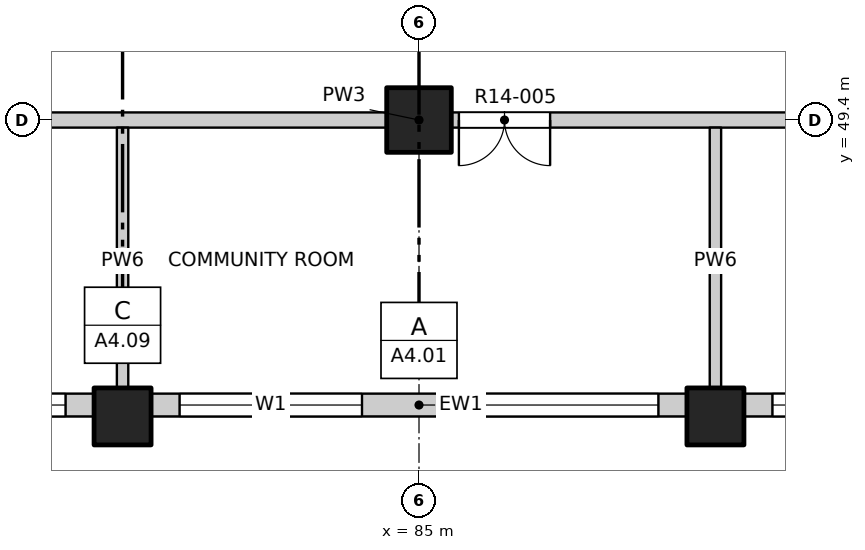
"""IFC4 building model, lengths in metres.
Left out: names, types, materials, properties, quantities, classifications, styles, units other than length and angle.
Written with IfcOpenShell. Run it as: python <this file> out.ifc"""

import sys

from ifc_helpers import new_model, si_unit, direction, frame, frame_2d, origin, origin_2d, place, context, subcontext, project, spatial, rectangle, extrude, element, fill, save


model = new_model("IFC4")
c1 = context("Model", 3, precision=1e-05, world=origin(), true_north=direction((0.0, 1.0)))
c2 = subcontext(c1, "Body", "Model", "MODEL_VIEW")
j1 = project(units=[si_unit("LENGTHUNIT", "METRE"), si_unit("PLANEANGLEUNIT", "RADIAN")], contexts=[c1])
p1 = place(None, origin())
s1 = spatial("IfcSite", under=j1, at=p1, CompositionType="ELEMENT")
p2 = place(p1, origin())
s2 = spatial("IfcBuilding", under=s1, at=p2, CompositionType="ELEMENT")
p3 = place(p2, frame((0.0, 0.0, 152.0)))
s3 = spatial("IfcBuildingStorey", under=s2, at=p3, CompositionType="ELEMENT", Elevation=152.0)
for number, where, z_axis, x_axis in (
    (1, (81.1, 45.5, -0.25), (0.0, 0.0, 1.0), (1.0, 0.0, 0.0)),
    (2, (88.9, 45.5, -0.25), (0.0, 0.0, 1.0), (1.0, 0.0, 0.0)),
):
    element("IfcColumn", number, at=place(p3, frame(where, z_axis=z_axis, x_axis=x_axis)), inside=s3, PredefinedType="COLUMN", context=c2, shape_type="SweptSolid", body=[
        extrude(rectangle(XDim=0.75, YDim=0.75, at=origin_2d()), origin(), (0.0, 0.0, 1.0), 3.4),
    ])
p4 = place(p3, frame((85.0, 49.4, -0.25), z_axis=(0.0, 0.0, 1.0), x_axis=(1.0, 0.0, 0.0)))
e3 = element("IfcColumn", 3, at=p4, inside=s3, PredefinedType="COLUMN", context=c2, shape_type="SweptSolid", body=[
    extrude(rectangle(XDim=0.85, YDim=0.85, at=origin_2d()), origin(), (0.0, 0.0, 1.0), 3.4),
])
p5 = place(p3, frame((73.675, 45.65, 0.0), z_axis=(0.0, 0.0, 1.0), x_axis=(1.0, 0.0, 0.0)))
e4 = element("IfcWall", 4, at=p5, inside=s3, PredefinedType="SOLIDWALL", context=c2, shape_type="SweptSolid", body=[
    extrude(rectangle(XDim=7.05, YDim=0.3, at=frame_2d((3.525, 0.0))), origin(), (0.0, 0.0, 1.0), 2.7),
])
p6 = place(p5, frame((0.375, 0.0, 0.9)))
e5 = element("IfcOpeningElement", 5, at=p6, cuts=e4, PredefinedType="OPENING", context=c2, shape_type="SweptSolid", body=[
    extrude(rectangle(XDim=2.4, YDim=1.8, at=frame_2d((1.2, 0.9))), frame((0.0, 0.16, 0.0), z_axis=(0.0, -1.0, 0.0), x_axis=(1.0, 0.0, 0.0)), (0.0, 0.0, 1.0), 0.32),
])
p7 = place(p5, frame((4.275, 0.0, 0.9)))
e6 = element("IfcOpeningElement", 6, at=p7, cuts=e4, PredefinedType="OPENING", context=c2, shape_type="SweptSolid", body=[
    extrude(rectangle(XDim=2.4, YDim=1.8, at=frame_2d((1.2, 0.9))), frame((0.0, 0.16, 0.0), z_axis=(0.0, -1.0, 0.0), x_axis=(1.0, 0.0, 0.0)), (0.0, 0.0, 1.0), 0.32),
])
p8 = place(p3, frame((81.475, 45.65, 0.0), z_axis=(0.0, 0.0, 1.0), x_axis=(1.0, 0.0, 0.0)))
e7 = element("IfcWall", 7, at=p8, inside=s3, PredefinedType="SOLIDWALL", context=c2, shape_type="SweptSolid", body=[
    extrude(rectangle(XDim=7.05, YDim=0.3, at=frame_2d((3.525, 0.0))), origin(), (0.0, 0.0, 1.0), 2.7),
])
p9 = place(p8, frame((0.375, 0.0, 0.9)))
e8 = element("IfcOpeningElement", 8, at=p9, cuts=e7, PredefinedType="OPENING", context=c2, shape_type="SweptSolid", body=[
    extrude(rectangle(XDim=2.4, YDim=1.8, at=frame_2d((1.2, 0.9))), frame((0.0, 0.16, 0.0), z_axis=(0.0, -1.0, 0.0), x_axis=(1.0, 0.0, 0.0)), (0.0, 0.0, 1.0), 0.32),
])
p10 = place(p8, frame((4.275, 0.0, 0.9)))
e9 = element("IfcOpeningElement", 9, at=p10, cuts=e7, PredefinedType="OPENING", context=c2, shape_type="SweptSolid", body=[
    extrude(rectangle(XDim=2.4, YDim=1.8, at=frame_2d((1.2, 0.9))), frame((0.0, 0.16, 0.0), z_axis=(0.0, -1.0, 0.0), x_axis=(1.0, 0.0, 0.0)), (0.0, 0.0, 1.0), 0.32),
])
p11 = place(p3, frame((89.275, 45.65, 0.0), z_axis=(0.0, 0.0, 1.0), x_axis=(1.0, 0.0, 0.0)))
e10 = element("IfcWall", 10, at=p11, inside=s3, PredefinedType="SOLIDWALL", context=c2, shape_type="SweptSolid", body=[
    extrude(rectangle(XDim=7.05, YDim=0.3, at=frame_2d((3.525, 0.0))), origin(), (0.0, 0.0, 1.0), 2.7),
])
p12 = place(p11, frame((0.375, 0.0, 0.9)))
e11 = element("IfcOpeningElement", 11, at=p12, cuts=e10, PredefinedType="OPENING", context=c2, shape_type="SweptSolid", body=[
    extrude(rectangle(XDim=2.4, YDim=1.8, at=frame_2d((1.2, 0.9))), frame((0.0, 0.16, 0.0), z_axis=(0.0, -1.0, 0.0), x_axis=(1.0, 0.0, 0.0)), (0.0, 0.0, 1.0), 0.32),
])
p13 = place(p11, frame((4.275, 0.0, 0.9)))
e12 = element("IfcOpeningElement", 12, at=p13, cuts=e10, PredefinedType="OPENING", context=c2, shape_type="SweptSolid", body=[
    extrude(rectangle(XDim=2.4, YDim=1.8, at=frame_2d((1.2, 0.9))), frame((0.0, 0.16, 0.0), z_axis=(0.0, -1.0, 0.0), x_axis=(1.0, 0.0, 0.0)), (0.0, 0.0, 1.0), 0.32),
])
p14 = place(p3, frame((73.2, 49.4, 0.0), z_axis=(0.0, 0.0, 1.0), x_axis=(1.0, 0.0, 0.0)))
e13 = element("IfcWall", 13, at=p14, inside=s3, PredefinedType="PARTITIONING", context=c2, shape_type="SweptSolid", body=[
    extrude(rectangle(XDim=23.6, YDim=0.2, at=frame_2d((11.8, 0.0))), origin(), (0.0, 0.0, 1.0), 3.15),
])
p15 = place(p14, frame((4.525, 0.0, 0.0)))
e14 = element("IfcOpeningElement", 14, at=p15, cuts=e13, PredefinedType="OPENING", context=c2, shape_type="SweptSolid", body=[
    extrude(rectangle(XDim=1.2, YDim=2.1, at=frame_2d((0.6, 1.05))), frame((0.0, 0.11, 0.0), z_axis=(0.0, -1.0, 0.0), x_axis=(1.0, 0.0, 0.0)), (0.0, 0.0, 1.0), 0.22),
])
p16 = place(p14, frame((12.325, 0.0, 0.0)))
e15 = element("IfcOpeningElement", 15, at=p16, cuts=e13, PredefinedType="OPENING", context=c2, shape_type="SweptSolid", body=[
    extrude(rectangle(XDim=1.2, YDim=2.1, at=frame_2d((0.6, 1.05))), frame((0.0, 0.11, 0.0), z_axis=(0.0, -1.0, 0.0), x_axis=(1.0, 0.0, 0.0)), (0.0, 0.0, 1.0), 0.22),
])
p17 = place(p14, frame((20.125, 0.0, 0.0)))
e16 = element("IfcOpeningElement", 16, at=p17, cuts=e13, PredefinedType="OPENING", context=c2, shape_type="SweptSolid", body=[
    extrude(rectangle(XDim=1.2, YDim=2.1, at=frame_2d((0.6, 1.05))), frame((0.0, 0.11, 0.0), z_axis=(0.0, -1.0, 0.0), x_axis=(1.0, 0.0, 0.0)), (0.0, 0.0, 1.0), 0.22),
])
for number, where, z_axis, x_axis in (
    (17, (81.1, 45.8, 0.0), (0.0, 0.0, 1.0), (0.0, 1.0, 0.0)),
    (18, (88.9, 45.8, 0.0), (0.0, 0.0, 1.0), (0.0, 1.0, 0.0)),
):
    element("IfcWall", number, at=place(p3, frame(where, z_axis=z_axis, x_axis=x_axis)), inside=s3, PredefinedType="PARTITIONING", context=c2, shape_type="SweptSolid", body=[
        extrude(rectangle(XDim=3.5, YDim=0.15, at=frame_2d((1.75, 0.0))), origin(), (0.0, 0.0, 1.0), 3.15),
    ])
p18 = place(p7, origin())
e19 = element("IfcWindow", 19, at=p18, inside=s3, PartitioningType="DOUBLE_PANEL_VERTICAL", PredefinedType="WINDOW", context=c2, shape_type="SweptSolid", body=[
    extrude(rectangle(XDim=2.4, YDim=1.8, at=frame_2d((1.2, 0.9))), frame((0.0, 0.03, 0.0), z_axis=(0.0, -1.0, 0.0), x_axis=(1.0, 0.0, 0.0)), (0.0, 0.0, 1.0), 0.06),
])
fill(e6, e19)
p19 = place(p9, origin())
e20 = element("IfcWindow", 20, at=p19, inside=s3, PartitioningType="DOUBLE_PANEL_VERTICAL", PredefinedType="WINDOW", context=c2, shape_type="SweptSolid", body=[
    extrude(rectangle(XDim=2.4, YDim=1.8, at=frame_2d((1.2, 0.9))), frame((0.0, 0.03, 0.0), z_axis=(0.0, -1.0, 0.0), x_axis=(1.0, 0.0, 0.0)), (0.0, 0.0, 1.0), 0.06),
])
fill(e8, e20)
p20 = place(p10, origin())
e21 = element("IfcWindow", 21, at=p20, inside=s3, PartitioningType="DOUBLE_PANEL_VERTICAL", PredefinedType="WINDOW", context=c2, shape_type="SweptSolid", body=[
    extrude(rectangle(XDim=2.4, YDim=1.8, at=frame_2d((1.2, 0.9))), frame((0.0, 0.03, 0.0), z_axis=(0.0, -1.0, 0.0), x_axis=(1.0, 0.0, 0.0)), (0.0, 0.0, 1.0), 0.06),
])
fill(e9, e21)
p21 = place(p12, origin())
e22 = element("IfcWindow", 22, at=p21, inside=s3, PartitioningType="DOUBLE_PANEL_VERTICAL", PredefinedType="WINDOW", context=c2, shape_type="SweptSolid", body=[
    extrude(rectangle(XDim=2.4, YDim=1.8, at=frame_2d((1.2, 0.9))), frame((0.0, 0.03, 0.0), z_axis=(0.0, -1.0, 0.0), x_axis=(1.0, 0.0, 0.0)), (0.0, 0.0, 1.0), 0.06),
])
fill(e11, e22)
p22 = place(p16, origin())
e23 = element("IfcDoor", 23, at=p22, inside=s3, OperationType="DOUBLE_DOOR_SINGLE_SWING", PredefinedType="DOOR", context=c2, shape_type="SweptSolid", body=[
    extrude(rectangle(XDim=1.2, YDim=2.1, at=frame_2d((0.6, 1.05))), frame((0.0, 0.025, 0.0), z_axis=(0.0, -1.0, 0.0), x_axis=(1.0, 0.0, 0.0)), (0.0, 0.0, 1.0), 0.05),
])
fill(e15, e23)
save(model, sys.argv[1])
